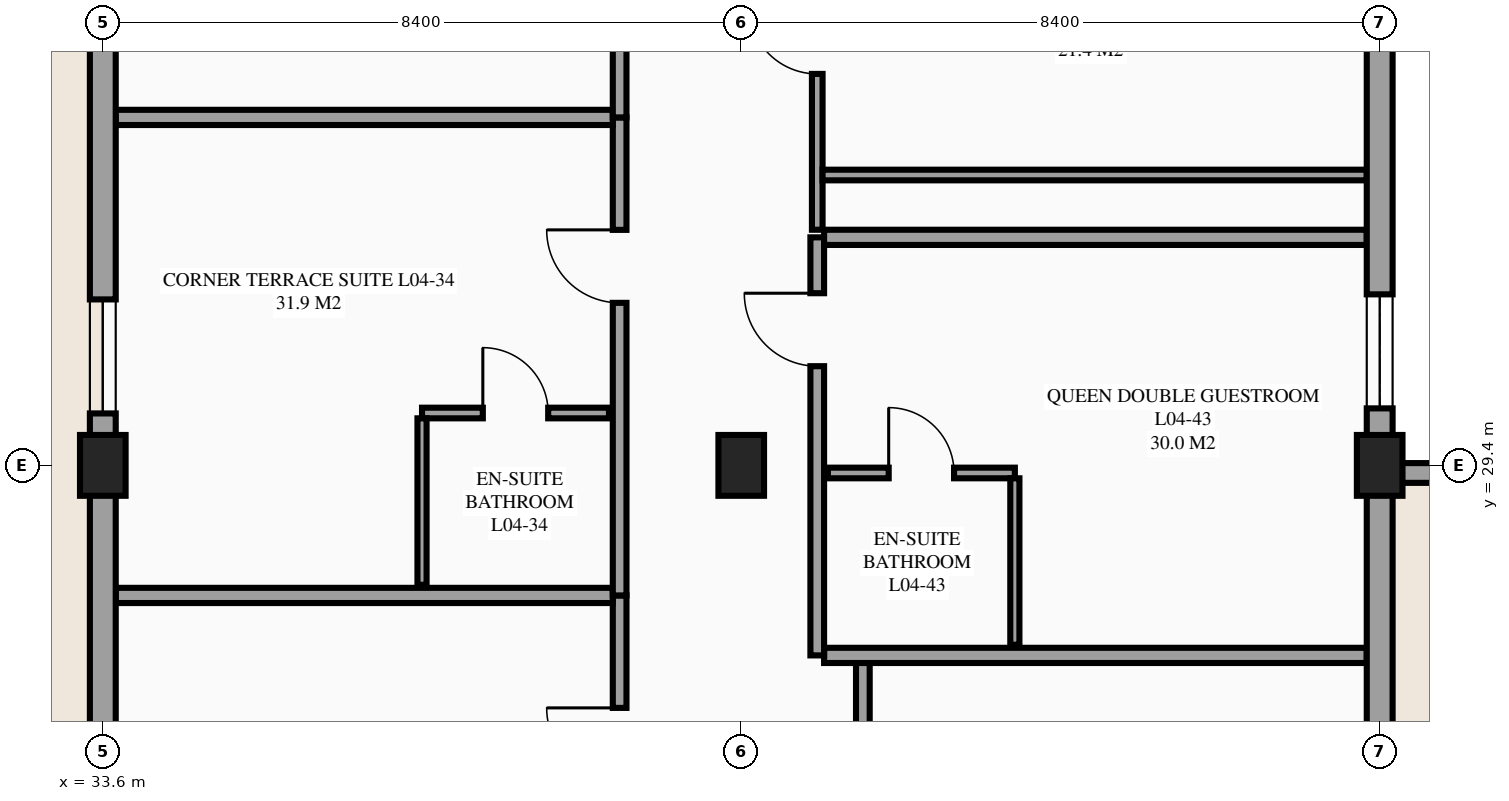
"""IFC4 building model, lengths in metres.
Left out: names, types, materials, properties, quantities, classifications, styles, units other than length and angle.
Written with IfcOpenShell. Run it as: python <this file> out.ifc"""

import sys

from ifc_helpers import new_model, si_unit, direction, frame, frame_2d, origin, origin_2d, place, context, subcontext, project, spatial, rectangle, extrude, element, fill, save


model = new_model("IFC4")
c1 = context("Model", 3, precision=1e-05, world=origin(), true_north=direction((0.0, 1.0)))
c2 = subcontext(c1, "Body", "Model", "MODEL_VIEW")
j1 = project(units=[si_unit("LENGTHUNIT", "METRE"), si_unit("PLANEANGLEUNIT", "RADIAN")], contexts=[c1])
p1 = place(None, origin())
s1 = spatial("IfcSite", under=j1, at=p1, CompositionType="ELEMENT")
p2 = place(p1, origin())
s2 = spatial("IfcBuilding", under=s1, at=p2, CompositionType="ELEMENT")
p3 = place(p2, frame((0.0, 0.0, 18.3)))
s3 = spatial("IfcBuildingStorey", under=s2, at=p3, CompositionType="ELEMENT", Elevation=18.3)
for number, where, z_axis, x_axis in (
    (1, (33.6, 29.4, 0.0), (0.0, 0.0, 1.0), (1.0, 0.0, 0.0)),
    (2, (42.0, 29.4, 0.0), (0.0, 0.0, 1.0), (1.0, 0.0, 0.0)),
    (3, (50.4, 29.4, 0.0), (0.0, 0.0, 1.0), (1.0, 0.0, 0.0)),
):
    element("IfcColumn", number, at=place(p3, frame(where, z_axis=z_axis, x_axis=x_axis)), inside=s3, PredefinedType="COLUMN", context=c2, shape_type="SweptSolid", body=[
        extrude(rectangle(XDim=0.6, YDim=0.8, at=origin_2d()), origin(), (0.0, 0.0, 1.0), 3.6),
    ])
p4 = place(p3, frame((50.4, 29.3, 0.0), z_axis=(0.0, 0.0, 1.0), x_axis=(1.0, 0.0, 0.0)))
e4 = element("IfcWall", 4, at=p4, inside=s3, PredefinedType="PARAPET", context=c2, shape_type="SweptSolid", body=[
    extrude(rectangle(XDim=75.6, YDim=0.26, at=frame_2d((37.8, 0.0))), origin(), (0.0, 0.0, 1.0), 1.15),
])
p5 = place(p3, frame((40.4, 21.4, 0.0), z_axis=(0.0, 0.0, 1.0), x_axis=(0.0, 1.0, 0.0)))
e5 = element("IfcWall", 5, at=p5, inside=s3, PredefinedType="PARTITIONING", context=c2, shape_type="SweptSolid", body=[
    extrude(rectangle(XDim=6.289, YDim=0.18, at=frame_2d((3.145, 0.0))), origin(), (0.0, 0.0, 1.0), 3.375),
])
p6 = place(p5, frame((3.849, 0.0, 0.0)))
e6 = element("IfcOpeningElement", 6, at=p6, cuts=e5, PredefinedType="OPENING", context=c2, shape_type="SweptSolid", body=[
    extrude(rectangle(XDim=0.96, YDim=2.15, at=frame_2d((0.48, 1.075))), frame((0.0, 0.1, 0.0), z_axis=(0.0, -1.0, 0.0), x_axis=(1.0, 0.0, 0.0)), (0.0, 0.0, 1.0), 0.2),
])
p7 = place(p3, frame((33.77, 27.689, 0.0), z_axis=(0.0, 0.0, 1.0), x_axis=(1.0, 0.0, 0.0)))
e7 = element("IfcWall", 7, at=p7, inside=s3, PredefinedType="PARTITIONING", context=c2, shape_type="SweptSolid", body=[
    extrude(rectangle(XDim=6.54, YDim=0.2, at=frame_2d((3.27, 0.0))), origin(), (0.0, 0.0, 1.0), 3.375),
])
p8 = place(p3, frame((40.4, 27.689, 0.0), z_axis=(0.0, 0.0, 1.0), x_axis=(0.0, 1.0, 0.0)))
e8 = element("IfcWall", 8, at=p8, inside=s3, PredefinedType="PARTITIONING", context=c2, shape_type="SweptSolid", body=[
    extrude(rectangle(XDim=6.289, YDim=0.18, at=frame_2d((3.145, 0.0))), origin(), (0.0, 0.0, 1.0), 3.375),
])
p9 = place(p8, frame((3.849, 0.0, 0.0)))
e9 = element("IfcOpeningElement", 9, at=p9, cuts=e8, PredefinedType="OPENING", context=c2, shape_type="SweptSolid", body=[
    extrude(rectangle(XDim=0.96, YDim=2.15, at=frame_2d((0.48, 1.075))), frame((0.0, 0.1, 0.0), z_axis=(0.0, -1.0, 0.0), x_axis=(1.0, 0.0, 0.0)), (0.0, 0.0, 1.0), 0.2),
])
p10 = place(p3, frame((33.77, 33.978, 0.0), z_axis=(0.0, 0.0, 1.0), x_axis=(1.0, 0.0, 0.0)))
e10 = element("IfcWall", 10, at=p10, inside=s3, PredefinedType="PARTITIONING", context=c2, shape_type="SweptSolid", body=[
    extrude(rectangle(XDim=6.54, YDim=0.2, at=frame_2d((3.27, 0.0))), origin(), (0.0, 0.0, 1.0), 3.375),
])
p11 = place(p3, frame((37.8, 30.089, 0.0), z_axis=(0.0, 0.0, 1.0), x_axis=(1.0, 0.0, 0.0)))
e11 = element("IfcWall", 11, at=p11, inside=s3, PredefinedType="PARTITIONING", context=c2, shape_type="SweptSolid", body=[
    extrude(rectangle(XDim=2.46, YDim=0.14, at=frame_2d((1.23, 0.0))), origin(), (0.0, 0.0, 1.0), 3.375),
])
p12 = place(p11, frame((0.8, 0.0, 0.0)))
e12 = element("IfcOpeningElement", 12, at=p12, cuts=e11, PredefinedType="OPENING", context=c2, shape_type="SweptSolid", body=[
    extrude(rectangle(XDim=0.86, YDim=2.1, at=frame_2d((0.43, 1.05))), frame((0.0, 0.08, 0.0), z_axis=(0.0, -1.0, 0.0), x_axis=(1.0, 0.0, 0.0)), (0.0, 0.0, 1.0), 0.16),
])
p13 = place(p3, frame((37.8, 27.829, 0.0), z_axis=(0.0, 0.0, 1.0), x_axis=(0.0, 1.0, 0.0)))
e13 = element("IfcWall", 13, at=p13, inside=s3, PredefinedType="PARTITIONING", context=c2, shape_type="SweptSolid", body=[
    extrude(rectangle(XDim=2.19, YDim=0.12, at=frame_2d((1.095, 0.0))), origin(), (0.0, 0.0, 1.0), 3.375),
])
p14 = place(p3, frame((40.4, 33.978, 0.0), z_axis=(0.0, 0.0, 1.0), x_axis=(0.0, 1.0, 0.0)))
e14 = element("IfcWall", 14, at=p14, inside=s3, PredefinedType="PARTITIONING", context=c2, shape_type="SweptSolid", body=[
    extrude(rectangle(XDim=6.289, YDim=0.18, at=frame_2d((3.145, 0.0))), origin(), (0.0, 0.0, 1.0), 3.375),
])
p15 = place(p14, frame((1.479, 0.0, 0.0)))
e15 = element("IfcOpeningElement", 15, at=p15, cuts=e14, PredefinedType="OPENING", context=c2, shape_type="SweptSolid", body=[
    extrude(rectangle(XDim=0.96, YDim=2.15, at=frame_2d((0.48, 1.075))), frame((0.0, 0.1, 0.0), z_axis=(0.0, -1.0, 0.0), x_axis=(1.0, 0.0, 0.0)), (0.0, 0.0, 1.0), 0.2),
])
p16 = place(p3, frame((43.6, 21.4, 0.0), z_axis=(0.0, 0.0, 1.0), x_axis=(0.0, 1.0, 0.0)))
e16 = element("IfcWall", 16, at=p16, inside=s3, PredefinedType="PARTITIONING", context=c2, shape_type="SweptSolid", body=[
    extrude(rectangle(XDim=5.5, YDim=0.18, at=frame_2d((2.75, 0.0))), origin(), (0.0, 0.0, 1.0), 3.375),
])
p17 = place(p16, frame((3.455, 0.0, 0.0)))
e17 = element("IfcOpeningElement", 17, at=p17, cuts=e16, PredefinedType="OPENING", context=c2, shape_type="SweptSolid", body=[
    extrude(rectangle(XDim=0.96, YDim=2.15, at=frame_2d((0.48, 1.075))), frame((0.0, 0.1, 0.0), z_axis=(0.0, -1.0, 0.0), x_axis=(1.0, 0.0, 0.0)), (0.0, 0.0, 1.0), 0.2),
])
p18 = place(p3, frame((43.09, 26.9, 0.0), z_axis=(0.0, 0.0, 1.0), x_axis=(1.0, 0.0, 0.0)))
e18 = element("IfcWall", 18, at=p18, inside=s3, PredefinedType="PARTITIONING", context=c2, shape_type="SweptSolid", body=[
    extrude(rectangle(XDim=7.14, YDim=0.2, at=frame_2d((3.57, 0.0))), origin(), (0.0, 0.0, 1.0), 3.375),
])
p19 = place(p3, frame((43.0, 26.9, 0.0), z_axis=(0.0, 0.0, 1.0), x_axis=(0.0, 1.0, 0.0)))
e19 = element("IfcWall", 19, at=p19, inside=s3, PredefinedType="PARTITIONING", context=c2, shape_type="SweptSolid", body=[
    extrude(rectangle(XDim=5.5, YDim=0.18, at=frame_2d((2.75, 0.0))), origin(), (0.0, 0.0, 1.0), 3.375),
])
p20 = place(p19, frame((3.805, 0.0, 0.0)))
e20 = element("IfcOpeningElement", 20, at=p20, cuts=e19, PredefinedType="OPENING", context=c2, shape_type="SweptSolid", body=[
    extrude(rectangle(XDim=0.96, YDim=2.15, at=frame_2d((0.48, 1.075))), frame((0.0, 0.1, 0.0), z_axis=(0.0, -1.0, 0.0), x_axis=(1.0, 0.0, 0.0)), (0.0, 0.0, 1.0), 0.2),
])
p21 = place(p3, frame((43.09, 32.4, 0.0), z_axis=(0.0, 0.0, 1.0), x_axis=(1.0, 0.0, 0.0)))
e21 = element("IfcWall", 21, at=p21, inside=s3, PredefinedType="PARTITIONING", context=c2, shape_type="SweptSolid", body=[
    extrude(rectangle(XDim=7.14, YDim=0.2, at=frame_2d((3.57, 0.0))), origin(), (0.0, 0.0, 1.0), 3.375),
])
p22 = place(p3, frame((43.14, 29.3, 0.0), z_axis=(0.0, 0.0, 1.0), x_axis=(1.0, 0.0, 0.0)))
e22 = element("IfcWall", 22, at=p22, inside=s3, PredefinedType="PARTITIONING", context=c2, shape_type="SweptSolid", body=[
    extrude(rectangle(XDim=2.46, YDim=0.14, at=frame_2d((1.23, 0.0))), origin(), (0.0, 0.0, 1.0), 2.78),
])
p23 = place(p22, frame((0.8, 0.0, 0.0)))
e23 = element("IfcOpeningElement", 23, at=p23, cuts=e22, PredefinedType="OPENING", context=c2, shape_type="SweptSolid", body=[
    extrude(rectangle(XDim=0.86, YDim=2.1, at=frame_2d((0.43, 1.05))), frame((0.0, 0.08, 0.0), z_axis=(0.0, -1.0, 0.0), x_axis=(1.0, 0.0, 0.0)), (0.0, 0.0, 1.0), 0.16),
])
p24 = place(p3, frame((45.6, 27.04, 0.0), z_axis=(0.0, 0.0, 1.0), x_axis=(0.0, 1.0, 0.0)))
e24 = element("IfcWall", 24, at=p24, inside=s3, PredefinedType="PARTITIONING", context=c2, shape_type="SweptSolid", body=[
    extrude(rectangle(XDim=2.19, YDim=0.12, at=frame_2d((1.095, 0.0))), origin(), (0.0, 0.0, 1.0), 3.375),
])
p25 = place(p3, frame((43.0, 32.5, 0.0), z_axis=(0.0, 0.0, 1.0), x_axis=(0.0, 1.0, 0.0)))
e25 = element("IfcWall", 25, at=p25, inside=s3, PredefinedType="PARTITIONING", context=c2, shape_type="SweptSolid", body=[
    extrude(rectangle(XDim=4.8, YDim=0.14, at=frame_2d((2.4, 0.0))), origin(), (0.0, 0.0, 1.0), 3.375),
])
p26 = place(p25, frame((2.05, 0.0, 0.0)))
e26 = element("IfcOpeningElement", 26, at=p26, cuts=e25, PredefinedType="OPENING", context=c2, shape_type="SweptSolid", body=[
    extrude(rectangle(XDim=0.9, YDim=2.12, at=frame_2d((0.45, 1.06))), frame((0.0, 0.08, 0.0), z_axis=(0.0, -1.0, 0.0), x_axis=(1.0, 0.0, 0.0)), (0.0, 0.0, 1.0), 0.16),
])
p27 = place(p3, frame((43.07, 33.22, 0.0), z_axis=(0.0, 0.0, 1.0), x_axis=(1.0, 0.0, 0.0)))
e27 = element("IfcWall", 27, at=p27, inside=s3, PredefinedType="PARTITIONING", context=c2, shape_type="SweptSolid", body=[
    extrude(rectangle(XDim=7.16, YDim=0.14, at=frame_2d((3.58, 0.0))), origin(), (0.0, 0.0, 1.0), 3.375),
])
p28 = place(p3, frame((50.4, 21.0, 0.0), z_axis=(0.0, 0.0, 1.0), x_axis=(0.0, 1.0, 0.0)))
e28 = element("IfcWall", 28, at=p28, inside=s3, PredefinedType="STANDARD", context=c2, shape_type="SweptSolid", body=[
    extrude(rectangle(XDim=8.4, YDim=0.34, at=frame_2d((4.2, 0.0))), origin(), (0.0, 0.0, 1.0), 2.63),
])
p29 = place(p28, frame((2.4, 0.0, 0.85)))
e29 = element("IfcOpeningElement", 29, at=p29, cuts=e28, PredefinedType="OPENING", context=c2, shape_type="SweptSolid", body=[
    extrude(rectangle(XDim=1.5, YDim=1.5, at=frame_2d((0.75, 0.75))), frame((0.0, 0.18, 0.0), z_axis=(0.0, -1.0, 0.0), x_axis=(1.0, 0.0, 0.0)), (0.0, 0.0, 1.0), 0.36),
])
p30 = place(p3, frame((50.4, 29.4, 0.0), z_axis=(0.0, 0.0, 1.0), x_axis=(0.0, 1.0, 0.0)))
e30 = element("IfcWall", 30, at=p30, inside=s3, PredefinedType="STANDARD", context=c2, shape_type="SweptSolid", body=[
    extrude(rectangle(XDim=8.4, YDim=0.34, at=frame_2d((4.2, 0.0))), origin(), (0.0, 0.0, 1.0), 2.73),
])
p31 = place(p30, frame((0.75, 0.0, 0.85)))
e31 = element("IfcOpeningElement", 31, at=p31, cuts=e30, PredefinedType="OPENING", context=c2, shape_type="SweptSolid", body=[
    extrude(rectangle(XDim=1.5, YDim=1.5, at=frame_2d((0.75, 0.75))), frame((0.0, 0.18, 0.0), z_axis=(0.0, -1.0, 0.0), x_axis=(1.0, 0.0, 0.0)), (0.0, 0.0, 1.0), 0.36),
])
p32 = place(p3, frame((33.6, 37.8, 0.0), z_axis=(0.0, 0.0, 1.0), x_axis=(0.0, -1.0, 0.0)))
e32 = element("IfcWall", 32, at=p32, inside=s3, PredefinedType="STANDARD", context=c2, shape_type="SweptSolid", body=[
    extrude(rectangle(XDim=8.4, YDim=0.34, at=frame_2d((4.2, 0.0))), origin(), (0.0, 0.0, 1.0), 2.78),
])
p33 = place(p32, frame((6.217, 0.0, 0.85)))
e33 = element("IfcOpeningElement", 33, at=p33, cuts=e32, PredefinedType="OPENING", context=c2, shape_type="SweptSolid", body=[
    extrude(rectangle(XDim=1.5, YDim=1.5, at=frame_2d((0.75, 0.75))), frame((0.0, 0.18, 0.0), z_axis=(0.0, -1.0, 0.0), x_axis=(1.0, 0.0, 0.0)), (0.0, 0.0, 1.0), 0.36),
])
p34 = place(p32, frame((0.678, 0.0, 0.85)))
e34 = element("IfcOpeningElement", 34, at=p34, cuts=e32, PredefinedType="OPENING", context=c2, shape_type="SweptSolid", body=[
    extrude(rectangle(XDim=1.5, YDim=1.5, at=frame_2d((0.75, 0.75))), frame((0.0, 0.18, 0.0), z_axis=(0.0, -1.0, 0.0), x_axis=(1.0, 0.0, 0.0)), (0.0, 0.0, 1.0), 0.36),
])
p35 = place(p3, frame((33.6, 29.4, 0.0), z_axis=(0.0, 0.0, 1.0), x_axis=(0.0, -1.0, 0.0)))
e35 = element("IfcWall", 35, at=p35, inside=s3, PredefinedType="STANDARD", context=c2, shape_type="SweptSolid", body=[
    extrude(rectangle(XDim=8.4, YDim=0.34, at=frame_2d((4.2, 0.0))), origin(), (0.0, 0.0, 1.0), 3.075),
])
p36 = place(p35, frame((4.106, 0.0, 0.85)))
e36 = element("IfcOpeningElement", 36, at=p36, cuts=e35, PredefinedType="OPENING", context=c2, shape_type="SweptSolid", body=[
    extrude(rectangle(XDim=1.5, YDim=1.5, at=frame_2d((0.75, 0.75))), frame((0.0, 0.18, 0.0), z_axis=(0.0, -1.0, 0.0), x_axis=(1.0, 0.0, 0.0)), (0.0, 0.0, 1.0), 0.36),
])
p37 = place(p33, origin())
e37 = element("IfcWindow", 37, at=p37, inside=s3, PartitioningType="SINGLE_PANEL", PredefinedType="WINDOW", context=c2, shape_type="SweptSolid", body=[
    extrude(rectangle(XDim=1.5, YDim=1.5, at=frame_2d((0.75, 0.75))), frame((0.0, 0.03, 0.0), z_axis=(0.0, -1.0, 0.0), x_axis=(1.0, 0.0, 0.0)), (0.0, 0.0, 1.0), 0.06),
])
fill(e33, e37)
p38 = place(p31, origin())
e38 = element("IfcWindow", 38, at=p38, inside=s3, PartitioningType="SINGLE_PANEL", PredefinedType="WINDOW", context=c2, shape_type="SweptSolid", body=[
    extrude(rectangle(XDim=1.5, YDim=1.5, at=frame_2d((0.75, 0.75))), frame((0.0, 0.03, 0.0), z_axis=(0.0, -1.0, 0.0), x_axis=(1.0, 0.0, 0.0)), (0.0, 0.0, 1.0), 0.06),
])
fill(e31, e38)
p39 = place(p6, origin())
e39 = element("IfcDoor", 39, at=p39, inside=s3, OperationType="SINGLE_SWING_RIGHT", PredefinedType="DOOR", context=c2, shape_type="SweptSolid", body=[
    extrude(rectangle(XDim=0.96, YDim=2.15, at=frame_2d((0.48, 1.075))), frame((0.0, 0.025, 0.0), z_axis=(0.0, -1.0, 0.0), x_axis=(1.0, 0.0, 0.0)), (0.0, 0.0, 1.0), 0.05),
])
fill(e6, e39)
p40 = place(p9, origin())
e40 = element("IfcDoor", 40, at=p40, inside=s3, OperationType="SINGLE_SWING_RIGHT", PredefinedType="DOOR", context=c2, shape_type="SweptSolid", body=[
    extrude(rectangle(XDim=0.96, YDim=2.15, at=frame_2d((0.48, 1.075))), frame((0.0, 0.025, 0.0), z_axis=(0.0, -1.0, 0.0), x_axis=(1.0, 0.0, 0.0)), (0.0, 0.0, 1.0), 0.05),
])
fill(e9, e40)
p41 = place(p12, origin())
e41 = element("IfcDoor", 41, at=p41, inside=s3, OperationType="SINGLE_SWING_LEFT", PredefinedType="DOOR", context=c2, shape_type="SweptSolid", body=[
    extrude(rectangle(XDim=0.86, YDim=2.1, at=frame_2d((0.43, 1.05))), frame((0.0, 0.025, 0.0), z_axis=(0.0, -1.0, 0.0), x_axis=(1.0, 0.0, 0.0)), (0.0, 0.0, 1.0), 0.05),
])
fill(e12, e41)
p42 = place(p20, origin())
e42 = element("IfcDoor", 42, at=p42, inside=s3, OperationType="SINGLE_SWING_RIGHT", PredefinedType="DOOR", context=c2, shape_type="SweptSolid", body=[
    extrude(rectangle(XDim=0.96, YDim=2.15, at=frame_2d((0.48, 1.075))), frame((0.0, 0.025, 0.0), z_axis=(0.0, -1.0, 0.0), x_axis=(1.0, 0.0, 0.0)), (0.0, 0.0, 1.0), 0.05),
])
fill(e20, e42)
p43 = place(p23, origin())
e43 = element("IfcDoor", 43, at=p43, inside=s3, OperationType="SINGLE_SWING_LEFT", PredefinedType="DOOR", context=c2, shape_type="SweptSolid", body=[
    extrude(rectangle(XDim=0.86, YDim=2.1, at=frame_2d((0.43, 1.05))), frame((0.0, 0.025, 0.0), z_axis=(0.0, -1.0, 0.0), x_axis=(1.0, 0.0, 0.0)), (0.0, 0.0, 1.0), 0.05),
])
fill(e23, e43)
p44 = place(p26, origin())
e44 = element("IfcDoor", 44, at=p44, inside=s3, OperationType="SINGLE_SWING_RIGHT", PredefinedType="DOOR", context=c2, shape_type="SweptSolid", body=[
    extrude(rectangle(XDim=0.9, YDim=2.12, at=frame_2d((0.45, 1.06))), frame((0.0, 0.025, 0.0), z_axis=(0.0, -1.0, 0.0), x_axis=(1.0, 0.0, 0.0)), (0.0, 0.0, 1.0), 0.05),
])
fill(e26, e44)
save(model, sys.argv[1])
